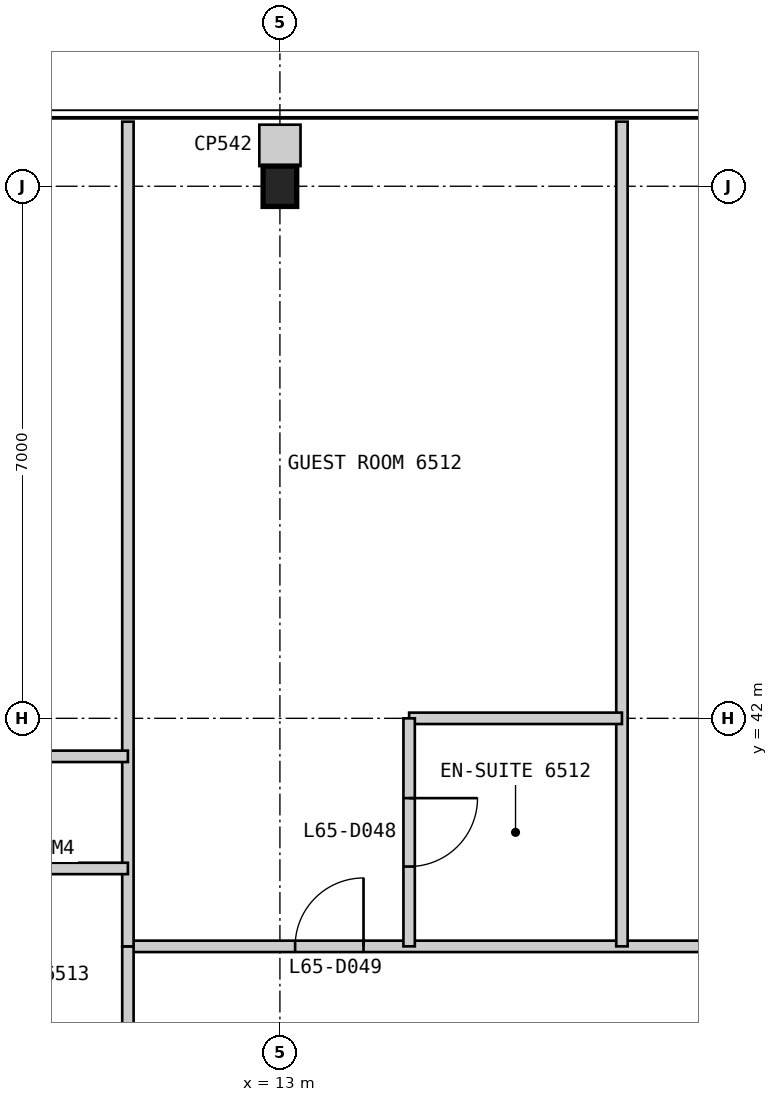
"""IFC4 building model, lengths in metres.
Left out: names, types, materials, properties, quantities, classifications, styles, units other than length and angle.
Written with IfcOpenShell. Run it as: python <this file> out.ifc"""

import sys

from ifc_helpers import new_model, si_unit, direction, frame, frame_2d, origin, origin_2d, place, context, subcontext, project, spatial, rectangle, i_section, extrude, element, fill, save


model = new_model("IFC4")
c1 = context("Model", 3, precision=1e-05, world=origin(), true_north=direction((0.0, 1.0)))
c2 = subcontext(c1, "Body", "Model", "MODEL_VIEW")
j1 = project(units=[si_unit("LENGTHUNIT", "METRE"), si_unit("PLANEANGLEUNIT", "RADIAN")], contexts=[c1])
p1 = place(None, origin())
s1 = spatial("IfcSite", under=j1, at=p1, CompositionType="ELEMENT")
p2 = place(p1, origin())
s2 = spatial("IfcBuilding", under=s1, at=p2, CompositionType="ELEMENT")
p3 = place(p2, frame((0.0, 0.0, 273.0)))
s3 = spatial("IfcBuildingStorey", under=s2, at=p3, CompositionType="ELEMENT", Elevation=273.0)
p4 = place(p3, frame((13.0, 49.0, 0.0), z_axis=(0.0, 0.0, 1.0), x_axis=(1.0, 0.0, 0.0)))
e1 = element("IfcColumn", 1, at=p4, inside=s3, PredefinedType="COLUMN", context=c2, shape_type="SweptSolid", body=[
    extrude(i_section(OverallWidth=0.442, OverallDepth=0.531, WebThickness=0.066, FlangeThickness=0.106, at=origin_2d()), origin(), (0.0, 0.0, 1.0), 3.4),
])
p5 = place(p3, frame((39.0, 39.0, 0.0), z_axis=(0.0, 0.0, 1.0), x_axis=(-1.0, 0.0, 0.0)))
e2 = element("IfcWall", 2, at=p5, inside=s3, PredefinedType="PARTITIONING", context=c2, shape_type="SweptSolid", body=[
    extrude(rectangle(XDim=28.0, YDim=0.15, at=frame_2d((14.0, 0.0))), origin(), (0.0, 0.0, 1.0), 2.844),
])
p6 = place(p5, frame((1.9, 0.0, 0.0)))
e3 = element("IfcOpeningElement", 3, at=p6, cuts=e2, PredefinedType="OPENING", context=c2, shape_type="SweptSolid", body=[
    extrude(rectangle(XDim=0.9, YDim=2.1, at=frame_2d((0.45, 1.05))), frame((0.0, 0.085, 0.0), z_axis=(0.0, -1.0, 0.0), x_axis=(1.0, 0.0, 0.0)), (0.0, 0.0, 1.0), 0.17),
])
p7 = place(p5, frame((5.2, 0.0, 0.0)))
e4 = element("IfcOpeningElement", 4, at=p7, cuts=e2, PredefinedType="OPENING", context=c2, shape_type="SweptSolid", body=[
    extrude(rectangle(XDim=0.9, YDim=2.1, at=frame_2d((0.45, 1.05))), frame((0.0, 0.085, 0.0), z_axis=(0.0, -1.0, 0.0), x_axis=(1.0, 0.0, 0.0)), (0.0, 0.0, 1.0), 0.17),
])
p8 = place(p5, frame((13.3, 0.0, 0.0)))
e5 = element("IfcOpeningElement", 5, at=p8, cuts=e2, PredefinedType="OPENING", context=c2, shape_type="SweptSolid", body=[
    extrude(rectangle(XDim=0.9, YDim=2.1, at=frame_2d((0.45, 1.05))), frame((0.0, 0.085, 0.0), z_axis=(0.0, -1.0, 0.0), x_axis=(1.0, 0.0, 0.0)), (0.0, 0.0, 1.0), 0.17),
])
p9 = place(p5, frame((24.9, 0.0, 0.0)))
e6 = element("IfcOpeningElement", 6, at=p9, cuts=e2, PredefinedType="OPENING", context=c2, shape_type="SweptSolid", body=[
    extrude(rectangle(XDim=0.9, YDim=2.1, at=frame_2d((0.45, 1.05))), frame((0.0, 0.085, 0.0), z_axis=(0.0, -1.0, 0.0), x_axis=(1.0, 0.0, 0.0)), (0.0, 0.0, 1.0), 0.17),
])
p10 = place(p3, frame((17.5, 49.85, 0.0), z_axis=(0.0, 0.0, 1.0), x_axis=(0.0, -1.0, 0.0)))
e7 = element("IfcWall", 7, at=p10, inside=s3, PredefinedType="PARTITIONING", context=c2, shape_type="SweptSolid", body=[
    extrude(rectangle(XDim=10.85, YDim=0.15, at=frame_2d((5.425, 0.0))), origin(), (0.0, 0.0, 1.0), 3.25),
])
p11 = place(p3, frame((17.5, 42.0, 0.0), z_axis=(0.0, 0.0, 1.0), x_axis=(-1.0, 0.0, 0.0)))
e8 = element("IfcWall", 8, at=p11, inside=s3, PredefinedType="PARTITIONING", context=c2, shape_type="SweptSolid", body=[
    extrude(rectangle(XDim=2.8, YDim=0.15, at=frame_2d((1.4, 0.0))), origin(), (0.0, 0.0, 1.0), 3.25),
])
p12 = place(p3, frame((14.7, 42.0, 0.0), z_axis=(0.0, 0.0, 1.0), x_axis=(0.0, -1.0, 0.0)))
e9 = element("IfcWall", 9, at=p12, inside=s3, PredefinedType="PARTITIONING", context=c2, shape_type="SweptSolid", body=[
    extrude(rectangle(XDim=3.0, YDim=0.15, at=frame_2d((1.5, 0.0))), origin(), (0.0, 0.0, 1.0), 3.25),
])
p13 = place(p12, frame((1.05, 0.0, 0.0)))
e10 = element("IfcOpeningElement", 10, at=p13, cuts=e9, PredefinedType="OPENING", context=c2, shape_type="SweptSolid", body=[
    extrude(rectangle(XDim=0.9, YDim=2.1, at=frame_2d((0.45, 1.05))), frame((0.0, 0.085, 0.0), z_axis=(0.0, -1.0, 0.0), x_axis=(1.0, 0.0, 0.0)), (0.0, 0.0, 1.0), 0.17),
])
p14 = place(p3, frame((11.0, 39.0, 0.0), z_axis=(0.0, 0.0, 1.0), x_axis=(0.0, -1.0, 0.0)))
e11 = element("IfcWall", 11, at=p14, inside=s3, PredefinedType="PARTITIONING", context=c2, shape_type="SweptSolid", body=[
    extrude(rectangle(XDim=28.0, YDim=0.15, at=frame_2d((14.0, 0.0))), origin(), (0.0, 0.0, 1.0), 2.844),
])
p15 = place(p14, frame((2.075, 0.0, 0.0)))
e12 = element("IfcOpeningElement", 12, at=p15, cuts=e11, PredefinedType="OPENING", context=c2, shape_type="SweptSolid", body=[
    extrude(rectangle(XDim=0.9, YDim=2.1, at=frame_2d((0.45, 1.05))), frame((0.0, 0.085, 0.0), z_axis=(0.0, -1.0, 0.0), x_axis=(1.0, 0.0, 0.0)), (0.0, 0.0, 1.0), 0.17),
])
p16 = place(p14, frame((5.2, 0.0, 0.0)))
e13 = element("IfcOpeningElement", 13, at=p16, cuts=e11, PredefinedType="OPENING", context=c2, shape_type="SweptSolid", body=[
    extrude(rectangle(XDim=0.9, YDim=2.1, at=frame_2d((0.45, 1.05))), frame((0.0, 0.085, 0.0), z_axis=(0.0, -1.0, 0.0), x_axis=(1.0, 0.0, 0.0)), (0.0, 0.0, 1.0), 0.17),
])
p17 = place(p14, frame((13.3, 0.0, 0.0)))
e14 = element("IfcOpeningElement", 14, at=p17, cuts=e11, PredefinedType="OPENING", context=c2, shape_type="SweptSolid", body=[
    extrude(rectangle(XDim=0.9, YDim=2.1, at=frame_2d((0.45, 1.05))), frame((0.0, 0.085, 0.0), z_axis=(0.0, -1.0, 0.0), x_axis=(1.0, 0.0, 0.0)), (0.0, 0.0, 1.0), 0.17),
])
p18 = place(p14, frame((24.9, 0.0, 0.0)))
e15 = element("IfcOpeningElement", 15, at=p18, cuts=e11, PredefinedType="OPENING", context=c2, shape_type="SweptSolid", body=[
    extrude(rectangle(XDim=0.9, YDim=2.1, at=frame_2d((0.45, 1.05))), frame((0.0, 0.085, 0.0), z_axis=(0.0, -1.0, 0.0), x_axis=(1.0, 0.0, 0.0)), (0.0, 0.0, 1.0), 0.17),
])
p19 = place(p3, frame((11.0, 49.85, 0.0), z_axis=(0.0, 0.0, 1.0), x_axis=(0.0, -1.0, 0.0)))
e16 = element("IfcWall", 16, at=p19, inside=s3, PredefinedType="PARTITIONING", context=c2, shape_type="SweptSolid", body=[
    extrude(rectangle(XDim=10.85, YDim=0.15, at=frame_2d((5.425, 0.0))), origin(), (0.0, 0.0, 1.0), 2.844),
])
p20 = place(p3, frame((8.0, 40.025, 0.0), z_axis=(0.0, 0.0, 1.0), x_axis=(1.0, 0.0, 0.0)))
e17 = element("IfcWall", 17, at=p20, inside=s3, PredefinedType="PARTITIONING", context=c2, shape_type="SweptSolid", body=[
    extrude(rectangle(XDim=3.0, YDim=0.15, at=frame_2d((1.5, 0.0))), origin(), (0.0, 0.0, 1.0), 3.25),
])
p21 = place(p3, frame((0.15, 41.5, 0.0), z_axis=(0.0, 0.0, 1.0), x_axis=(1.0, 0.0, 0.0)))
e18 = element("IfcWall", 18, at=p21, inside=s3, PredefinedType="PARTITIONING", context=c2, shape_type="SweptSolid", body=[
    extrude(rectangle(XDim=10.85, YDim=0.15, at=frame_2d((5.425, 0.0))), origin(), (0.0, 0.0, 1.0), 3.25),
])
p22 = place(p21, frame((5.0, 0.0, 0.0)))
e19 = element("IfcOpeningElement", 19, at=p22, cuts=e18, PredefinedType="OPENING", context=c2, shape_type="SweptSolid", body=[
    extrude(rectangle(XDim=0.9, YDim=2.1, at=frame_2d((0.45, 1.05))), frame((0.0, 0.085, 0.0), z_axis=(0.0, -1.0, 0.0), x_axis=(1.0, 0.0, 0.0)), (0.0, 0.0, 1.0), 0.17),
])
p23 = place(p3, frame((13.0, 49.81, 0.0), z_axis=(0.0, 0.0, 1.0), x_axis=(0.0, -1.0, 0.0)))
e20 = element("IfcWall", 20, at=p23, inside=s3, PredefinedType="PARTITIONING", context=c2, shape_type="SweptSolid", body=[
    extrude(rectangle(XDim=0.545, YDim=0.542, at=frame_2d((0.272, 0.0))), origin(), (0.0, 0.0, 1.0), 3.25),
])
p24 = place(p13, origin())
e21 = element("IfcDoor", 21, at=p24, inside=s3, OperationType="SINGLE_SWING_LEFT", PredefinedType="DOOR", context=c2, shape_type="SweptSolid", body=[
    extrude(rectangle(XDim=0.9, YDim=2.1, at=frame_2d((0.45, 1.05))), frame((0.0, 0.025, 0.0), z_axis=(0.0, -1.0, 0.0), x_axis=(1.0, 0.0, 0.0)), (0.0, 0.0, 1.0), 0.05),
])
fill(e10, e21)
p25 = place(p9, frame((0.9, 0.0, 0.0), z_axis=(0.0, 0.0, 1.0), x_axis=(-1.0, 0.0, 0.0)))
e22 = element("IfcDoor", 22, at=p25, inside=s3, OperationType="SINGLE_SWING_RIGHT", PredefinedType="DOOR", context=c2, shape_type="SweptSolid", body=[
    extrude(rectangle(XDim=0.9, YDim=2.1, at=frame_2d((0.45, 1.05))), frame((0.0, 0.025, 0.0), z_axis=(0.0, -1.0, 0.0), x_axis=(1.0, 0.0, 0.0)), (0.0, 0.0, 1.0), 0.05),
])
fill(e6, e22)
save(model, sys.argv[1])
